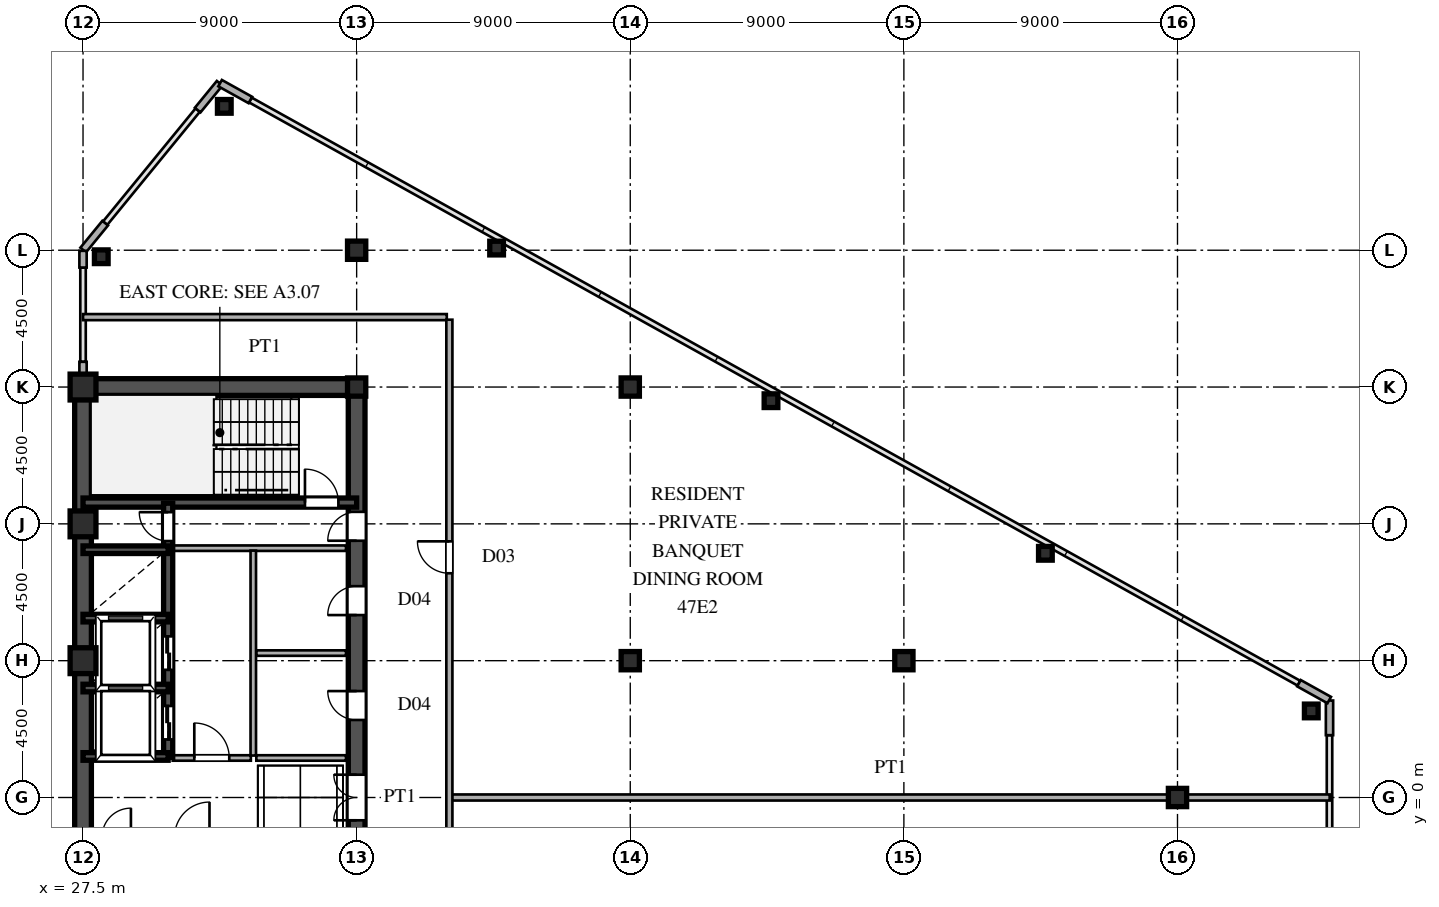
"""IFC4 building model, lengths in metres.
Left out: names, types, materials, properties, quantities, classifications, styles, units other than length and angle.
Written with IfcOpenShell. Run it as: python <this file> out.ifc"""

import sys

from ifc_helpers import new_model, si_unit, direction, frame, frame_2d, origin, origin_2d, place, context, subcontext, project, spatial, rectangle, hollow_rectangle, i_section, extrude, source, transform, mapped, element, fill, save


model = new_model("IFC4")
c1 = context("Model", 3, precision=1e-05, world=origin(), true_north=direction((0.0, 1.0)))
c2 = subcontext(c1, "Body", "Model", "MODEL_VIEW")
j1 = project(units=[si_unit("LENGTHUNIT", "METRE"), si_unit("PLANEANGLEUNIT", "RADIAN")], contexts=[c1])
p1 = place(None, origin())
s1 = spatial("IfcSite", under=j1, at=p1, CompositionType="ELEMENT")
p2 = place(p1, origin())
s2 = spatial("IfcBuilding", under=s1, at=p2, CompositionType="ELEMENT")
p3 = place(p2, frame((0.0, 0.0, 177.9)))
s3 = spatial("IfcBuildingStorey", under=s2, at=p3, CompositionType="ELEMENT", Elevation=177.9)
m1 = source(origin(), c2, "Body", "SweptSolid", [
    extrude(hollow_rectangle(XDim=0.85, YDim=0.85, WallThickness=0.036, at=origin_2d()), origin(), (0.0, 0.0, 1.0), 3.6),
])
for number, where, z_axis, x_axis in (
    (1, (27.5, 4.5, 0.0), (0.0, 0.0, 1.0), (1.0, 0.0, 0.0)),
    (2, (27.5, 9.0, 0.0), (0.0, 0.0, 1.0), (1.0, 0.0, 0.0)),
    (3, (27.5, 13.5, 0.0), (0.0, 0.0, 1.0), (1.0, 0.0, 0.0)),
):
    element("IfcColumn", number, at=place(p3, frame(where, z_axis=z_axis, x_axis=x_axis)), inside=s3, PredefinedType="COLUMN", context=c2, shape_type="MappedRepresentation", body=[
        mapped(m1, transform((0.0, 0.0, 0.0), scale=1.0)),
    ])
m2 = source(origin(), c2, "Body", "SweptSolid", [
    extrude(i_section(OverallWidth=0.6, OverallDepth=0.6, WebThickness=0.025, FlangeThickness=0.04, at=origin_2d()), origin(), (0.0, 0.0, 1.0), 3.6),
])
for number, where, z_axis, x_axis in (
    (4, (36.5, 13.5, 0.0), (0.0, 0.0, 1.0), (1.0, 0.0, 0.0)),
    (5, (36.5, 18.0, 0.0), (0.0, 0.0, 1.0), (1.0, 0.0, 0.0)),
    (6, (45.5, 4.5, 0.0), (0.0, 0.0, 1.0), (1.0, 0.0, 0.0)),
    (7, (45.5, 13.5, 0.0), (0.0, 0.0, 1.0), (1.0, 0.0, 0.0)),
    (8, (54.5, 4.5, 0.0), (0.0, 0.0, 1.0), (1.0, 0.0, 0.0)),
    (9, (63.5, 0.0, 0.0), (0.0, 0.0, 1.0), (1.0, 0.0, 0.0)),
):
    element("IfcColumn", number, at=place(p3, frame(where, z_axis=z_axis, x_axis=x_axis)), inside=s3, PredefinedType="COLUMN", context=c2, shape_type="MappedRepresentation", body=[
        mapped(m2, transform((0.0, 0.0, 0.0), scale=1.0)),
    ])
m3 = source(origin(), c2, "Body", "SweptSolid", [
    extrude(hollow_rectangle(XDim=0.45, YDim=0.45, WallThickness=0.018, at=origin_2d()), origin(), (0.0, 0.0, 1.0), 3.6),
])
for number, where, z_axis, x_axis in (
    (10, (67.9, 2.847, 0.0), (0.0, 0.0, 1.0), (1.0, 0.0, 0.0)),
    (11, (32.147, 22.732, 0.0), (0.0, 0.0, 1.0), (1.0, 0.0, 0.0)),
    (12, (28.1, 17.786, 0.0), (0.0, 0.0, 1.0), (1.0, 0.0, 0.0)),
    (13, (41.104, 18.071, 0.0), (0.0, 0.0, 1.0), (1.0, 0.0, 0.0)),
    (14, (50.129, 13.051, 0.0), (0.0, 0.0, 1.0), (1.0, 0.0, 0.0)),
    (15, (59.155, 8.031, 0.0), (0.0, 0.0, 1.0), (1.0, 0.0, 0.0)),
):
    element("IfcColumn", number, at=place(p3, frame(where, z_axis=z_axis, x_axis=x_axis)), inside=s3, PredefinedType="COLUMN", context=c2, shape_type="MappedRepresentation", body=[
        mapped(m3, transform((0.0, 0.0, 0.0), scale=1.0)),
    ])
for number, where, z_axis, x_axis in (
    (16, (68.5, 2.05, 0.0), (0.0, 0.0, 1.0), (0.0, 1.0, 0.0)),
    (17, (68.491, 3.205, 0.0), (0.0, 0.0, 1.0), (-0.874, 0.486, 0.0)),
    (18, (33.005, 22.941, 0.0), (0.0, 0.0, 1.0), (-0.874, 0.486, 0.0)),
):
    element("IfcWall", number, at=place(p3, frame(where, z_axis=z_axis, x_axis=x_axis)), inside=s3, PredefinedType="SOLIDWALL", context=c2, shape_type="SweptSolid", body=[
        extrude(rectangle(XDim=1.14, YDim=0.24, at=frame_2d((0.57, 0.0))), origin(), (0.0, 0.0, 1.0), 3.38),
    ])
for number, where, z_axis, x_axis in (
    (19, (31.994, 23.492, 0.0), (0.0, 0.0, 1.0), (-0.633, -0.774, 0.0)),
    (20, (28.228, 18.89, 0.0), (0.0, 0.0, 1.0), (-0.633, -0.774, 0.0)),
):
    element("IfcWall", number, at=place(p3, frame(where, z_axis=z_axis, x_axis=x_axis)), inside=s3, PredefinedType="SOLIDWALL", context=c2, shape_type="SweptSolid", body=[
        extrude(rectangle(XDim=1.14, YDim=0.24, at=frame_2d((0.57, 0.0))), origin(), (0.0, 0.0, 1.0), 3.38),
    ])
p4 = place(p3, frame((27.5, 13.78, 0.0), z_axis=(0.0, 0.0, 1.0), x_axis=(0.0, 1.0, 0.0)))
e21 = element("IfcWall", 21, at=p4, inside=s3, PredefinedType="SOLIDWALL", context=c2, shape_type="SweptSolid", body=[
    extrude(rectangle(XDim=0.55, YDim=0.24, at=frame_2d((0.275, 0.0))), origin(), (0.0, 0.0, 1.0), 2.88),
])
p5 = place(p3, frame((27.5, 17.43, 0.0), z_axis=(0.0, 0.0, 1.0), x_axis=(0.0, 1.0, 0.0)))
e22 = element("IfcWall", 22, at=p5, inside=s3, PredefinedType="SOLIDWALL", context=c2, shape_type="SweptSolid", body=[
    extrude(rectangle(XDim=0.55, YDim=0.24, at=frame_2d((0.275, 0.0))), origin(), (0.0, 0.0, 1.0), 3.38),
])
p6 = place(p3, frame((27.5, 1.3, 0.0), z_axis=(0.0, 0.0, 1.0), x_axis=(0.0, 1.0, 0.0)))
e23 = element("IfcWall", 23, at=p6, inside=s3, PredefinedType="SHEAR", context=c2, shape_type="SweptSolid", body=[
    extrude(rectangle(XDim=12.2, YDim=0.55, at=frame_2d((6.1, 0.0))), origin(), (0.0, 0.0, 1.0), 3.38),
])
p7 = place(p3, frame((27.5, -1.3, 0.0), z_axis=(0.0, 0.0, 1.0), x_axis=(0.0, 1.0, 0.0)))
e24 = element("IfcWall", 24, at=p7, inside=s3, PredefinedType="SHEAR", context=c2, shape_type="SweptSolid", body=[
    extrude(rectangle(XDim=2.6, YDim=0.55, at=frame_2d((1.3, 0.0))), origin(), (0.0, 0.0, 1.0), 3.38),
])
p8 = place(p3, frame((27.5, 13.5, 0.0), z_axis=(0.0, 0.0, 1.0), x_axis=(1.0, 0.0, 0.0)))
e25 = element("IfcWall", 25, at=p8, inside=s3, PredefinedType="SHEAR", context=c2, shape_type="SweptSolid", body=[
    extrude(rectangle(XDim=9.0, YDim=0.55, at=frame_2d((4.5, 0.0))), origin(), (0.0, 0.0, 1.0), 3.38),
])
p9 = place(p3, frame((36.5, -1.3, 0.0), z_axis=(0.0, 0.0, 1.0), x_axis=(0.0, 1.0, 0.0)))
e26 = element("IfcWall", 26, at=p9, inside=s3, PredefinedType="SHEAR", context=c2, shape_type="SweptSolid", body=[
    extrude(rectangle(XDim=2.6, YDim=0.55, at=frame_2d((1.3, 0.0))), origin(), (0.0, 0.0, 1.0), 3.38),
])
p10 = place(p9, frame((0.55, 0.0, 0.0)))
e27 = element("IfcOpeningElement", 27, at=p10, cuts=e26, PredefinedType="OPENING", context=c2, shape_type="SweptSolid", body=[
    extrude(rectangle(XDim=1.5, YDim=2.3, at=frame_2d((0.75, 1.15))), frame((0.0, 0.285, 0.0), z_axis=(0.0, -1.0, 0.0), x_axis=(1.0, 0.0, 0.0)), (0.0, 0.0, 1.0), 0.57),
])
p11 = place(p3, frame((36.5, 8.2, 0.0), z_axis=(0.0, 0.0, 1.0), x_axis=(0.0, 1.0, 0.0)))
e28 = element("IfcWall", 28, at=p11, inside=s3, PredefinedType="SHEAR", context=c2, shape_type="SweptSolid", body=[
    extrude(rectangle(XDim=5.45, YDim=0.55, at=frame_2d((2.725, 0.0))), origin(), (0.0, 0.0, 1.0), 3.38),
])
p12 = place(p11, frame((0.245, 0.0, 0.0)))
e29 = element("IfcOpeningElement", 29, at=p12, cuts=e28, PredefinedType="OPENING", context=c2, shape_type="SweptSolid", body=[
    extrude(rectangle(XDim=0.95, YDim=2.15, at=frame_2d((0.475, 1.075))), frame((0.0, 0.285, 0.0), z_axis=(0.0, -1.0, 0.0), x_axis=(1.0, 0.0, 0.0)), (0.0, 0.0, 1.0), 0.57),
])
p13 = place(p3, frame((36.5, 1.3, 0.0), z_axis=(0.0, 0.0, 1.0), x_axis=(0.0, 1.0, 0.0)))
e30 = element("IfcWall", 30, at=p13, inside=s3, PredefinedType="SHEAR", context=c2, shape_type="SweptSolid", body=[
    extrude(rectangle(XDim=3.45, YDim=0.55, at=frame_2d((1.725, 0.0))), origin(), (0.0, 0.0, 1.0), 3.38),
])
p14 = place(p13, frame((1.25, 0.0, 0.0)))
e31 = element("IfcOpeningElement", 31, at=p14, cuts=e30, PredefinedType="OPENING", context=c2, shape_type="SweptSolid", body=[
    extrude(rectangle(XDim=0.95, YDim=2.15, at=frame_2d((0.475, 1.075))), frame((0.0, 0.285, 0.0), z_axis=(0.0, -1.0, 0.0), x_axis=(1.0, 0.0, 0.0)), (0.0, 0.0, 1.0), 0.57),
])
p15 = place(p3, frame((36.5, 4.75, 0.0), z_axis=(0.0, 0.0, 1.0), x_axis=(0.0, 1.0, 0.0)))
e32 = element("IfcWall", 32, at=p15, inside=s3, PredefinedType="SHEAR", context=c2, shape_type="SweptSolid", body=[
    extrude(rectangle(XDim=3.45, YDim=0.55, at=frame_2d((1.725, 0.0))), origin(), (0.0, 0.0, 1.0), 3.38),
])
p16 = place(p15, frame((1.25, 0.0, 0.0)))
e33 = element("IfcOpeningElement", 33, at=p16, cuts=e32, PredefinedType="OPENING", context=c2, shape_type="SweptSolid", body=[
    extrude(rectangle(XDim=0.95, YDim=2.15, at=frame_2d((0.475, 1.075))), frame((0.0, 0.285, 0.0), z_axis=(0.0, -1.0, 0.0), x_axis=(1.0, 0.0, 0.0)), (0.0, 0.0, 1.0), 0.57),
])
p17 = place(p3, frame((27.5, 9.7, 0.0), z_axis=(0.0, 0.0, 1.0), x_axis=(1.0, 0.0, 0.0)))
e34 = element("IfcWall", 34, at=p17, inside=s3, PredefinedType="SHEAR", context=c2, shape_type="SweptSolid", body=[
    extrude(rectangle(XDim=9.0, YDim=0.3, at=frame_2d((4.5, 0.0))), origin(), (0.0, 0.0, 1.0), 3.38),
])
p18 = place(p17, frame((7.3, 0.0, 0.0)))
e35 = element("IfcOpeningElement", 35, at=p18, cuts=e34, PredefinedType="OPENING", context=c2, shape_type="SweptSolid", body=[
    extrude(rectangle(XDim=1.1, YDim=2.2, at=frame_2d((0.55, 1.1))), frame((0.0, 0.16, 0.0), z_axis=(0.0, -1.0, 0.0), x_axis=(1.0, 0.0, 0.0)), (0.0, 0.0, 1.0), 0.32),
])
for number, where, z_axis, x_axis in (
    (36, (27.5, 1.35, 0.0), (0.0, 0.0, 1.0), (1.0, 0.0, 0.0)),
    (37, (27.5, 3.6, 0.0), (0.0, 0.0, 1.0), (1.0, 0.0, 0.0)),
    (38, (27.5, 5.9, 0.0), (0.0, 0.0, 1.0), (1.0, 0.0, 0.0)),
    (39, (27.5, 8.15, 0.0), (0.0, 0.0, 1.0), (1.0, 0.0, 0.0)),
):
    element("IfcWall", number, at=place(p3, frame(where, z_axis=z_axis, x_axis=x_axis)), inside=s3, PredefinedType="SHEAR", context=c2, shape_type="SweptSolid", body=[
        extrude(rectangle(XDim=2.8, YDim=0.25, at=frame_2d((1.4, 0.0))), origin(), (0.0, 0.0, 1.0), 3.38),
    ])
p19 = place(p3, frame((30.3, 1.32, 0.0), z_axis=(0.0, 0.0, 1.0), x_axis=(0.0, 1.0, 0.0)))
e40 = element("IfcWall", 40, at=p19, inside=s3, PredefinedType="SHEAR", context=c2, shape_type="SweptSolid", body=[
    extrude(rectangle(XDim=2.28, YDim=0.3, at=frame_2d((1.14, 0.0))), origin(), (0.0, 0.0, 1.0), 3.38),
])
p20 = place(p19, frame((0.59, 0.0, 0.0)))
e41 = element("IfcOpeningElement", 41, at=p20, cuts=e40, PredefinedType="OPENING", context=c2, shape_type="SweptSolid", body=[
    extrude(rectangle(XDim=1.1, YDim=2.2, at=frame_2d((0.55, 1.1))), frame((0.0, 0.16, 0.0), z_axis=(0.0, -1.0, 0.0), x_axis=(1.0, 0.0, 0.0)), (0.0, 0.0, 1.0), 0.32),
])
p21 = place(p3, frame((30.3, 3.6, 0.0), z_axis=(0.0, 0.0, 1.0), x_axis=(0.0, 1.0, 0.0)))
e42 = element("IfcWall", 42, at=p21, inside=s3, PredefinedType="SHEAR", context=c2, shape_type="SweptSolid", body=[
    extrude(rectangle(XDim=2.3, YDim=0.3, at=frame_2d((1.15, 0.0))), origin(), (0.0, 0.0, 1.0), 3.38),
])
p22 = place(p21, frame((0.6, 0.0, 0.0)))
e43 = element("IfcOpeningElement", 43, at=p22, cuts=e42, PredefinedType="OPENING", context=c2, shape_type="SweptSolid", body=[
    extrude(rectangle(XDim=1.1, YDim=2.2, at=frame_2d((0.55, 1.1))), frame((0.0, 0.16, 0.0), z_axis=(0.0, -1.0, 0.0), x_axis=(1.0, 0.0, 0.0)), (0.0, 0.0, 1.0), 0.32),
])
p23 = place(p3, frame((30.3, 5.9, 0.0), z_axis=(0.0, 0.0, 1.0), x_axis=(0.0, 1.0, 0.0)))
e44 = element("IfcWall", 44, at=p23, inside=s3, PredefinedType="SHEAR", context=c2, shape_type="SweptSolid", body=[
    extrude(rectangle(XDim=2.25, YDim=0.3, at=frame_2d((1.125, 0.0))), origin(), (0.0, 0.0, 1.0), 3.38),
])
p24 = place(p3, frame((30.3, 8.15, 0.0), z_axis=(0.0, 0.0, 1.0), x_axis=(0.0, 1.0, 0.0)))
e45 = element("IfcWall", 45, at=p24, inside=s3, PredefinedType="SHEAR", context=c2, shape_type="SweptSolid", body=[
    extrude(rectangle(XDim=1.53, YDim=0.3, at=frame_2d((0.765, 0.0))), origin(), (0.0, 0.0, 1.0), 3.38),
])
p25 = place(p24, frame((0.285, 0.0, 0.0)))
e46 = element("IfcOpeningElement", 46, at=p25, cuts=e45, PredefinedType="OPENING", context=c2, shape_type="SweptSolid", body=[
    extrude(rectangle(XDim=0.95, YDim=2.15, at=frame_2d((0.475, 1.075))), frame((0.0, 0.16, 0.0), z_axis=(0.0, -1.0, 0.0), x_axis=(1.0, 0.0, 0.0)), (0.0, 0.0, 1.0), 0.32),
])
p26 = place(p3, frame((30.45, 8.2, 0.0), z_axis=(0.0, 0.0, 1.0), x_axis=(1.0, 0.0, 0.0)))
e47 = element("IfcWall", 47, at=p26, inside=s3, PredefinedType="PARTITIONING", context=c2, shape_type="SweptSolid", body=[
    extrude(rectangle(XDim=5.7, YDim=0.18, at=frame_2d((2.85, 0.0))), origin(), (0.0, 0.0, 1.0), 3.38),
])
p27 = place(p3, frame((33.1, 1.38, 0.0), z_axis=(0.0, 0.0, 1.0), x_axis=(0.0, 1.0, 0.0)))
e48 = element("IfcWall", 48, at=p27, inside=s3, PredefinedType="PARTITIONING", context=c2, shape_type="SweptSolid", body=[
    extrude(rectangle(XDim=6.74, YDim=0.18, at=frame_2d((3.37, 0.0))), origin(), (0.0, 0.0, 1.0), 3.38),
])
p28 = place(p3, frame((30.45, 1.3, 0.0), z_axis=(0.0, 0.0, 1.0), x_axis=(1.0, 0.0, 0.0)))
e49 = element("IfcWall", 49, at=p28, inside=s3, PredefinedType="PARTITIONING", context=c2, shape_type="SweptSolid", body=[
    extrude(rectangle(XDim=2.57, YDim=0.18, at=frame_2d((1.285, 0.0))), origin(), (0.0, 0.0, 1.0), 3.38),
])
p29 = place(p28, frame((0.71, 0.0, 0.0)))
e50 = element("IfcOpeningElement", 50, at=p29, cuts=e49, PredefinedType="OPENING", context=c2, shape_type="SweptSolid", body=[
    extrude(rectangle(XDim=1.15, YDim=2.2, at=frame_2d((0.575, 1.1))), frame((0.0, 0.1, 0.0), z_axis=(0.0, -1.0, 0.0), x_axis=(1.0, 0.0, 0.0)), (0.0, 0.0, 1.0), 0.2),
])
for number, where, z_axis, x_axis in (
    (51, (33.2, 1.3, 0.0), (0.0, 0.0, 1.0), (1.0, 0.0, 0.0)),
    (52, (33.2, 4.75, 0.0), (0.0, 0.0, 1.0), (1.0, 0.0, 0.0)),
):
    element("IfcWall", number, at=place(p3, frame(where, z_axis=z_axis, x_axis=x_axis)), inside=s3, PredefinedType="PARTITIONING", context=c2, shape_type="SweptSolid", body=[
        extrude(rectangle(XDim=2.95, YDim=0.18, at=frame_2d((1.475, 0.0))), origin(), (0.0, 0.0, 1.0), 3.38),
    ])
p30 = place(p3, frame((39.63, 0.0, 0.0), z_axis=(0.0, 0.0, 1.0), x_axis=(1.0, 0.0, 0.0)))
e53 = element("IfcWall", 53, at=p30, inside=s3, PredefinedType="PARTITIONING", context=c2, shape_type="SweptSolid", body=[
    extrude(rectangle(XDim=28.875, YDim=0.2, at=frame_2d((14.438, 0.0))), origin(), (0.0, 0.0, 1.0), 3.38),
])
p31 = place(p3, frame((27.5, 15.8, 0.0), z_axis=(0.0, 0.0, 1.0), x_axis=(1.0, 0.0, 0.0)))
e54 = element("IfcWall", 54, at=p31, inside=s3, PredefinedType="PARTITIONING", context=c2, shape_type="SweptSolid", body=[
    extrude(rectangle(XDim=11.965, YDim=0.2, at=frame_2d((5.982, 0.0))), origin(), (0.0, 0.0, 1.0), 3.38),
])
p32 = place(p3, frame((39.55, -15.715, 0.0), z_axis=(0.0, 0.0, 1.0), x_axis=(0.0, 1.0, 0.0)))
e55 = element("IfcWall", 55, at=p32, inside=s3, PredefinedType="PARTITIONING", context=c2, shape_type="SweptSolid", body=[
    extrude(rectangle(XDim=31.43, YDim=0.2, at=frame_2d((15.715, 0.0))), origin(), (0.0, 0.0, 1.0), 3.38),
])
p33 = place(p32, frame((7.29, 0.0, 0.0)))
e56 = element("IfcOpeningElement", 56, at=p33, cuts=e55, PredefinedType="OPENING", context=c2, shape_type="SweptSolid", body=[
    extrude(rectangle(XDim=1.05, YDim=2.25, at=frame_2d((0.525, 1.125))), frame((0.0, 0.11, 0.0), z_axis=(0.0, -1.0, 0.0), x_axis=(1.0, 0.0, 0.0)), (0.0, 0.0, 1.0), 0.22),
])
p34 = place(p32, frame((23.09, 0.0, 0.0)))
e57 = element("IfcOpeningElement", 57, at=p34, cuts=e55, PredefinedType="OPENING", context=c2, shape_type="SweptSolid", body=[
    extrude(rectangle(XDim=1.05, YDim=2.25, at=frame_2d((0.525, 1.125))), frame((0.0, 0.11, 0.0), z_axis=(0.0, -1.0, 0.0), x_axis=(1.0, 0.0, 0.0)), (0.0, 0.0, 1.0), 0.22),
])
m4 = source(origin(), c2, "Body", "SweptSolid", [
    extrude(rectangle(XDim=1.5, YDim=2.3, at=frame_2d((0.75, 1.15))), frame((0.0, 0.025, 0.0), z_axis=(0.0, -1.0, 0.0), x_axis=(1.0, 0.0, 0.0)), (0.0, 0.0, 1.0), 0.05),
])
p35 = place(p10, origin())
e58 = element("IfcDoor", 58, at=p35, inside=s3, OperationType="DOUBLE_SWING_LEFT", PredefinedType="DOOR", context=c2, shape_type="MappedRepresentation", body=[
    mapped(m4, transform((0.0, 0.0, 0.0), scale=1.0)),
])
fill(e27, e58)
m5 = source(origin(), c2, "Body", "SweptSolid", [
    extrude(rectangle(XDim=0.95, YDim=2.15, at=frame_2d((0.475, 1.075))), frame((0.0, 0.025, 0.0), z_axis=(0.0, -1.0, 0.0), x_axis=(1.0, 0.0, 0.0)), (0.0, 0.0, 1.0), 0.05),
])
p36 = place(p12, origin())
e59 = element("IfcDoor", 59, at=p36, inside=s3, OperationType="SINGLE_SWING_LEFT", PredefinedType="DOOR", context=c2, shape_type="MappedRepresentation", body=[
    mapped(m5, transform((0.0, 0.0, 0.0), scale=1.0)),
])
fill(e29, e59)
p37 = place(p14, origin())
e60 = element("IfcDoor", 60, at=p37, inside=s3, OperationType="SINGLE_SWING_RIGHT", PredefinedType="DOOR", context=c2, shape_type="MappedRepresentation", body=[
    mapped(m5, transform((0.0, 0.0, 0.0), scale=1.0)),
])
fill(e31, e60)
p38 = place(p16, origin())
e61 = element("IfcDoor", 61, at=p38, inside=s3, OperationType="SINGLE_SWING_LEFT", PredefinedType="DOOR", context=c2, shape_type="MappedRepresentation", body=[
    mapped(m5, transform((0.0, 0.0, 0.0), scale=1.0)),
])
fill(e33, e61)
m6 = source(origin(), c2, "Body", "SweptSolid", [
    extrude(rectangle(XDim=1.1, YDim=2.2, at=frame_2d((0.55, 1.1))), frame((0.0, 0.025, 0.0), z_axis=(0.0, -1.0, 0.0), x_axis=(1.0, 0.0, 0.0)), (0.0, 0.0, 1.0), 0.05),
])
p39 = place(p18, origin())
e62 = element("IfcDoor", 62, at=p39, inside=s3, OperationType="SINGLE_SWING_LEFT", PredefinedType="DOOR", context=c2, shape_type="MappedRepresentation", body=[
    mapped(m6, transform((0.0, 0.0, 0.0), scale=1.0)),
])
fill(e35, e62)
m7 = source(origin(), c2, "Body", "SweptSolid", [
    extrude(rectangle(XDim=1.1, YDim=2.2, at=frame_2d((0.55, 1.1))), frame((0.0, 0.025, 0.0), z_axis=(0.0, -1.0, 0.0), x_axis=(1.0, 0.0, 0.0)), (0.0, 0.0, 1.0), 0.05),
])
p40 = place(p20, origin())
e63 = element("IfcDoor", 63, at=p40, inside=s3, OperationType="DOUBLE_DOOR_SLIDING", PredefinedType="DOOR", context=c2, shape_type="MappedRepresentation", body=[
    mapped(m7, transform((0.0, 0.0, 0.0), scale=1.0)),
])
fill(e41, e63)
p41 = place(p22, origin())
e64 = element("IfcDoor", 64, at=p41, inside=s3, OperationType="DOUBLE_DOOR_SLIDING", PredefinedType="DOOR", context=c2, shape_type="MappedRepresentation", body=[
    mapped(m7, transform((0.0, 0.0, 0.0), scale=1.0)),
])
fill(e43, e64)
p42 = place(p25, origin())
e65 = element("IfcDoor", 65, at=p42, inside=s3, OperationType="SINGLE_SWING_RIGHT", PredefinedType="DOOR", context=c2, shape_type="MappedRepresentation", body=[
    mapped(m5, transform((0.0, 0.0, 0.0), scale=1.0)),
])
fill(e46, e65)
m8 = source(origin(), c2, "Body", "SweptSolid", [
    extrude(rectangle(XDim=1.15, YDim=2.2, at=frame_2d((0.575, 1.1))), frame((0.0, 0.025, 0.0), z_axis=(0.0, -1.0, 0.0), x_axis=(1.0, 0.0, 0.0)), (0.0, 0.0, 1.0), 0.05),
])
p43 = place(p29, origin())
e66 = element("IfcDoor", 66, at=p43, inside=s3, OperationType="SINGLE_SWING_LEFT", PredefinedType="DOOR", context=c2, shape_type="MappedRepresentation", body=[
    mapped(m8, transform((0.0, 0.0, 0.0), scale=1.0)),
])
fill(e50, e66)
m9 = source(origin(), c2, "Body", "SweptSolid", [
    extrude(rectangle(XDim=1.05, YDim=2.25, at=frame_2d((0.525, 1.125))), frame((0.0, 0.025, 0.0), z_axis=(0.0, -1.0, 0.0), x_axis=(1.0, 0.0, 0.0)), (0.0, 0.0, 1.0), 0.05),
])
p44 = place(p34, origin())
e67 = element("IfcDoor", 67, at=p44, inside=s3, OperationType="SINGLE_SWING_RIGHT", PredefinedType="DOOR", context=c2, shape_type="MappedRepresentation", body=[
    mapped(m9, transform((0.0, 0.0, 0.0), scale=1.0)),
])
fill(e57, e67)
save(model, sys.argv[1])
